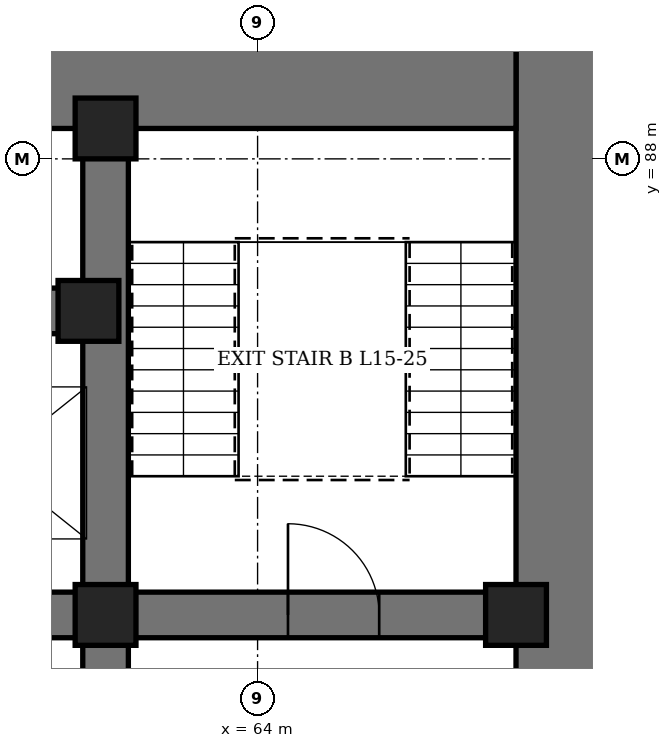
"""IFC4 building model, lengths in metres.
Left out: names, types, materials, properties, quantities, classifications, styles, units other than length and angle.
Written with IfcOpenShell. Run it as: python <this file> out.ifc"""

import sys

from ifc_helpers import new_model, si_unit, direction, frame, frame_2d, origin, origin_2d, place, context, subcontext, project, spatial, rectangle, hollow_rectangle, extrude, element, fill, save


model = new_model("IFC4")
c1 = context("Model", 3, precision=1e-05, world=origin(), true_north=direction((0.0, 1.0)))
c2 = subcontext(c1, "Body", "Model", "MODEL_VIEW")
j1 = project(units=[si_unit("LENGTHUNIT", "METRE"), si_unit("PLANEANGLEUNIT", "RADIAN")], contexts=[c1])
p1 = place(None, origin())
s1 = spatial("IfcSite", under=j1, at=p1, CompositionType="ELEMENT")
p2 = place(p1, origin())
s2 = spatial("IfcBuilding", under=s1, at=p2, CompositionType="ELEMENT")
p3 = place(p2, frame((0.0, 0.0, 72.7)))
s3 = spatial("IfcBuildingStorey", under=s2, at=p3, CompositionType="ELEMENT", Elevation=72.7)
p4 = place(p3, frame((68.0, 70.4, 0.0), z_axis=(0.0, 0.0, 1.0), x_axis=(0.0, 1.0, 0.0)))
e1 = element("IfcWall", 1, at=p4, inside=s3, PredefinedType="SHEAR", context=c2, shape_type="SweptSolid", body=[
    extrude(rectangle(XDim=19.2, YDim=1.2, at=frame_2d((9.6, 0.0))), origin(), (0.0, 0.0, 1.0), 4.2),
])
p5 = place(p4, frame((8.6, 0.0, 0.0)))
e2 = element("IfcOpeningElement", 2, at=p5, cuts=e1, PredefinedType="OPENING", context=c2, shape_type="SweptSolid", body=[
    extrude(rectangle(XDim=2.0, YDim=2.4, at=frame_2d((1.0, 1.2))), frame((0.0, 0.61, 0.0), z_axis=(0.0, -1.0, 0.0), x_axis=(1.0, 0.0, 0.0)), (0.0, 0.0, 1.0), 1.22),
])
p6 = place(p3, frame((44.6, 89.0, 0.0), z_axis=(0.0, 0.0, 1.0), x_axis=(1.0, 0.0, 0.0)))
e3 = element("IfcWall", 3, at=p6, inside=s3, PredefinedType="SHEAR", context=c2, shape_type="SweptSolid", body=[
    extrude(rectangle(XDim=22.8, YDim=1.2, at=frame_2d((11.4, 0.0))), origin(), (0.0, 0.0, 1.0), 4.2),
])
p7 = place(p6, frame((9.4, 0.0, 0.0)))
e4 = element("IfcOpeningElement", 4, at=p7, cuts=e3, PredefinedType="OPENING", context=c2, shape_type="SweptSolid", body=[
    extrude(rectangle(XDim=1.0, YDim=2.1, at=frame_2d((0.5, 1.05))), frame((0.0, 0.61, 0.0), z_axis=(0.0, -1.0, 0.0), x_axis=(1.0, 0.0, 0.0)), (0.0, 0.0, 1.0), 1.22),
])
p8 = place(p6, frame((6.65, 0.0, 0.0)))
e5 = element("IfcOpeningElement", 5, at=p8, cuts=e3, PredefinedType="OPENING", context=c2, shape_type="SweptSolid", body=[
    extrude(rectangle(XDim=0.9, YDim=2.1, at=frame_2d((0.45, 1.05))), frame((0.0, 0.61, 0.0), z_axis=(0.0, -1.0, 0.0), x_axis=(1.0, 0.0, 0.0)), (0.0, 0.0, 1.0), 1.22),
])
p9 = place(p6, frame((12.1, 0.0, 0.0)))
e6 = element("IfcOpeningElement", 6, at=p9, cuts=e3, PredefinedType="OPENING", context=c2, shape_type="SweptSolid", body=[
    extrude(rectangle(XDim=0.9, YDim=2.1, at=frame_2d((0.45, 1.05))), frame((0.0, 0.61, 0.0), z_axis=(0.0, -1.0, 0.0), x_axis=(1.0, 0.0, 0.0)), (0.0, 0.0, 1.0), 1.22),
])
p10 = place(p6, frame((14.0, 0.0, 0.0)))
e7 = element("IfcOpeningElement", 7, at=p10, cuts=e3, PredefinedType="OPENING", context=c2, shape_type="SweptSolid", body=[
    extrude(rectangle(XDim=0.9, YDim=2.1, at=frame_2d((0.45, 1.05))), frame((0.0, 0.61, 0.0), z_axis=(0.0, -1.0, 0.0), x_axis=(1.0, 0.0, 0.0)), (0.0, 0.0, 1.0), 1.22),
])
p11 = place(p3, frame((62.0, 71.6, 0.0), z_axis=(0.0, 0.0, 1.0), x_axis=(0.0, 1.0, 0.0)))
e8 = element("IfcWall", 8, at=p11, inside=s3, PredefinedType="SHEAR", context=c2, shape_type="SweptSolid", body=[
    extrude(rectangle(XDim=16.8, YDim=0.6, at=frame_2d((8.4, 0.0))), origin(), (0.0, 0.0, 1.0), 4.2),
])
p12 = place(p11, frame((7.5, 0.0, 0.0)))
e9 = element("IfcOpeningElement", 9, at=p12, cuts=e8, PredefinedType="OPENING", context=c2, shape_type="SweptSolid", body=[
    extrude(rectangle(XDim=1.8, YDim=2.4, at=frame_2d((0.9, 1.2))), frame((0.0, 0.31, 0.0), z_axis=(0.0, -1.0, 0.0), x_axis=(1.0, 0.0, 0.0)), (0.0, 0.0, 1.0), 0.62),
])
p13 = place(p3, frame((62.3, 82.0, 0.0), z_axis=(0.0, 0.0, 1.0), x_axis=(1.0, 0.0, 0.0)))
e10 = element("IfcWall", 10, at=p13, inside=s3, PredefinedType="SHEAR", context=c2, shape_type="SweptSolid", body=[
    extrude(rectangle(XDim=5.1, YDim=0.6, at=frame_2d((2.55, 0.0))), origin(), (0.0, 0.0, 1.0), 4.2),
])
p14 = place(p13, frame((2.1, 0.0, 0.0)))
e11 = element("IfcOpeningElement", 11, at=p14, cuts=e10, PredefinedType="OPENING", context=c2, shape_type="SweptSolid", body=[
    extrude(rectangle(XDim=1.2, YDim=2.1, at=frame_2d((0.6, 1.05))), frame((0.0, 0.31, 0.0), z_axis=(0.0, -1.0, 0.0), x_axis=(1.0, 0.0, 0.0)), (0.0, 0.0, 1.0), 0.62),
])
for number, where, z_axis, x_axis in (
    (12, (50.3, 82.0, 0.0), (0.0, 0.0, 1.0), (1.0, 0.0, 0.0)),
    (13, (50.3, 86.0, 0.0), (0.0, 0.0, 1.0), (1.0, 0.0, 0.0)),
):
    element("IfcWall", number, at=place(p3, frame(where, z_axis=z_axis, x_axis=x_axis)), inside=s3, PredefinedType="SHEAR", context=c2, shape_type="SweptSolid", body=[
        extrude(rectangle(XDim=11.4, YDim=0.6, at=frame_2d((5.7, 0.0))), origin(), (0.0, 0.0, 1.0), 4.2),
    ])
for number, where, z_axis, x_axis in (
    (14, (61.775, 86.0, 0.0), (0.0, 0.0, 1.0), (1.0, 0.0, 0.0)),
    (15, (62.0, 82.0, 0.0), (0.0, 0.0, 1.0), (1.0, 0.0, 0.0)),
    (16, (62.0, 88.4, 0.0), (0.0, 0.0, 1.0), (1.0, 0.0, 0.0)),
    (17, (67.4, 82.0, 0.0), (0.0, 0.0, 1.0), (1.0, 0.0, 0.0)),
):
    element("IfcColumn", number, at=place(p3, frame(where, z_axis=z_axis, x_axis=x_axis)), inside=s3, PredefinedType="COLUMN", context=c2, shape_type="SweptSolid", body=[
        extrude(hollow_rectangle(XDim=0.8, YDim=0.8, WallThickness=0.1, at=origin_2d()), origin(), (0.0, 0.0, 1.0), 4.2),
    ])
p15 = place(p14, origin())
e18 = element("IfcDoor", 18, at=p15, inside=s3, OperationType="SINGLE_SWING_LEFT", PredefinedType="DOOR", context=c2, shape_type="SweptSolid", body=[
    extrude(rectangle(XDim=1.2, YDim=2.1, at=frame_2d((0.6, 1.05))), frame((0.0, 0.3, 0.0), z_axis=(0.0, -1.0, 0.0), x_axis=(1.0, 0.0, 0.0)), (0.0, 0.0, 1.0), 0.6),
])
fill(e11, e18)
save(model, sys.argv[1])
